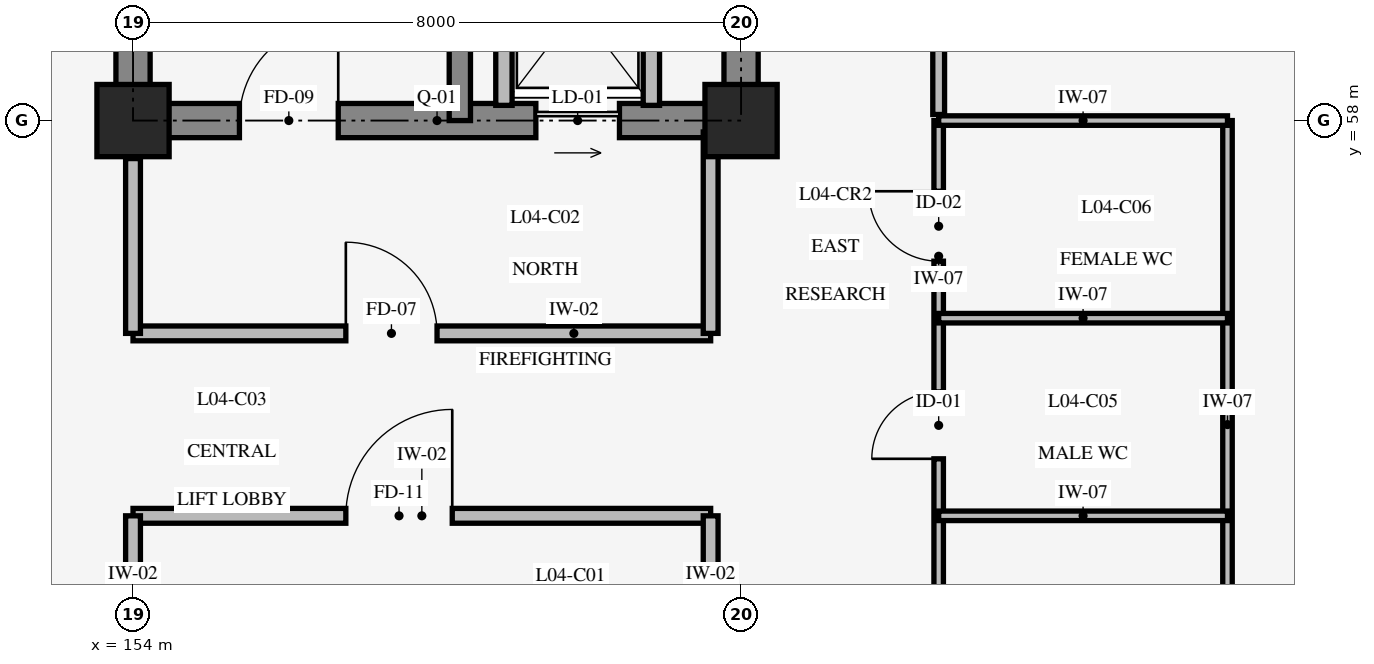
"""IFC4 building model, lengths in metres.
Left out: names, types, materials, properties, quantities, classifications, styles, units other than length and angle.
Written with IfcOpenShell. Run it as: python <this file> out.ifc"""

import sys

from ifc_helpers import new_model, si_unit, direction, frame, frame_2d, origin, origin_2d, place, context, subcontext, project, spatial, rectangle, extrude, element, fill, save


model = new_model("IFC4")
c1 = context("Model", 3, precision=1e-05, world=origin(), true_north=direction((0.0, 1.0)))
c2 = subcontext(c1, "Body", "Model", "MODEL_VIEW")
j1 = project(units=[si_unit("LENGTHUNIT", "METRE"), si_unit("PLANEANGLEUNIT", "RADIAN")], contexts=[c1])
p1 = place(None, origin())
s1 = spatial("IfcSite", under=j1, at=p1, CompositionType="ELEMENT")
p2 = place(p1, origin())
s2 = spatial("IfcBuilding", under=s1, at=p2, CompositionType="ELEMENT")
p3 = place(p2, frame((0.0, 0.0, 15.0)))
s3 = spatial("IfcBuildingStorey", under=s2, at=p3, CompositionType="ELEMENT", Elevation=15.0)
p4 = place(p3, frame((154.0, 58.0, 0.0), z_axis=(0.0, 0.0, 1.0), x_axis=(1.0, 0.0, 0.0)))
e1 = element("IfcWall", 1, at=p4, inside=s3, PredefinedType="SHEAR", context=c2, shape_type="SweptSolid", body=[
    extrude(rectangle(XDim=8.0, YDim=0.45, at=frame_2d((4.0, 0.0))), origin(), (0.0, 0.0, 1.0), 3.95),
])
p5 = place(p4, frame((1.4, 0.0, 0.0)))
e2 = element("IfcOpeningElement", 2, at=p5, cuts=e1, PredefinedType="OPENING", context=c2, shape_type="SweptSolid", body=[
    extrude(rectangle(XDim=1.3, YDim=2.15, at=frame_2d((0.65, 1.075))), frame((0.0, 0.235, 0.0), z_axis=(0.0, -1.0, 0.0), x_axis=(1.0, 0.0, 0.0)), (0.0, 0.0, 1.0), 0.47),
])
p6 = place(p4, frame((5.3, 0.0, 0.0)))
e3 = element("IfcOpeningElement", 3, at=p6, cuts=e1, PredefinedType="OPENING", context=c2, shape_type="SweptSolid", body=[
    extrude(rectangle(XDim=1.1, YDim=2.2, at=frame_2d((0.55, 1.1))), frame((0.0, 0.235, 0.0), z_axis=(0.0, -1.0, 0.0), x_axis=(1.0, 0.0, 0.0)), (0.0, 0.0, 1.0), 0.47),
])
p7 = place(p3, frame((162.0, 58.0, 0.0), z_axis=(0.0, 0.0, 1.0), x_axis=(0.0, 1.0, 0.0)))
e4 = element("IfcWall", 4, at=p7, inside=s3, PredefinedType="SHEAR", context=c2, shape_type="SweptSolid", body=[
    extrude(rectangle(XDim=8.0, YDim=0.45, at=frame_2d((4.0, 0.0))), origin(), (0.0, 0.0, 1.0), 3.95),
])
p8 = place(p7, frame((3.275, 0.0, 0.0)))
e5 = element("IfcOpeningElement", 5, at=p8, cuts=e4, PredefinedType="OPENING", context=c2, shape_type="SweptSolid", body=[
    extrude(rectangle(XDim=1.05, YDim=2.2, at=frame_2d((0.525, 1.1))), frame((0.0, 0.235, 0.0), z_axis=(0.0, -1.0, 0.0), x_axis=(1.0, 0.0, 0.0)), (0.0, 0.0, 1.0), 0.47),
])
p9 = place(p7, frame((5.45, 0.0, 0.0)))
e6 = element("IfcOpeningElement", 6, at=p9, cuts=e4, PredefinedType="OPENING", context=c2, shape_type="SweptSolid", body=[
    extrude(rectangle(XDim=1.4, YDim=2.3, at=frame_2d((0.7, 1.15))), frame((0.0, 0.235, 0.0), z_axis=(0.0, -1.0, 0.0), x_axis=(1.0, 0.0, 0.0)), (0.0, 0.0, 1.0), 0.47),
])
p10 = place(p3, frame((154.0, 66.0, 0.0), z_axis=(0.0, 0.0, 1.0), x_axis=(0.0, -1.0, 0.0)))
e7 = element("IfcWall", 7, at=p10, inside=s3, PredefinedType="SHEAR", context=c2, shape_type="SweptSolid", body=[
    extrude(rectangle(XDim=8.0, YDim=0.45, at=frame_2d((4.0, 0.0))), origin(), (0.0, 0.0, 1.0), 3.95),
])
p11 = place(p3, frame((158.3, 58.0, 0.0), z_axis=(0.0, 0.0, 1.0), x_axis=(0.0, 1.0, 0.0)))
e8 = element("IfcWall", 8, at=p11, inside=s3, PredefinedType="SHEAR", context=c2, shape_type="SweptSolid", body=[
    extrude(rectangle(XDim=8.0, YDim=0.28, at=frame_2d((4.0, 0.0))), origin(), (0.0, 0.0, 1.0), 3.95),
])
for number, where, z_axis, x_axis in (
    (9, (154.0, 58.0, 0.0), (0.0, 0.0, 1.0), (1.0, 0.0, 0.0)),
    (10, (162.0, 58.0, 0.0), (0.0, 0.0, 1.0), (1.0, 0.0, 0.0)),
):
    element("IfcColumn", number, at=place(p3, frame(where, z_axis=z_axis, x_axis=x_axis)), inside=s3, PredefinedType="COLUMN", context=c2, shape_type="SweptSolid", body=[
        extrude(rectangle(XDim=0.95, YDim=0.95, at=origin_2d()), origin(), (0.0, 0.0, 1.0), 4.2),
    ])
for number, where, z_axis, x_axis in (
    (11, (160.82, 58.2, 0.0), (0.0, 0.0, 1.0), (0.0, 1.0, 0.0)),
    (12, (158.88, 58.2, 0.0), (0.0, 0.0, 1.0), (0.0, 1.0, 0.0)),
):
    element("IfcWall", number, at=place(p3, frame(where, z_axis=z_axis, x_axis=x_axis)), inside=s3, PredefinedType="STANDARD", context=c2, shape_type="SweptSolid", body=[
        extrude(rectangle(XDim=2.55, YDim=0.215, at=frame_2d((1.275, 0.0))), origin(), (0.0, 0.0, 1.0), 3.9),
    ])
p12 = place(p3, frame((154.0, 52.8, 0.0), z_axis=(0.0, 0.0, 1.0), x_axis=(1.0, 0.0, 0.0)))
e13 = element("IfcWall", 13, at=p12, inside=s3, PredefinedType="STANDARD", context=c2, shape_type="SweptSolid", body=[
    extrude(rectangle(XDim=7.6, YDim=0.195, at=frame_2d((3.8, 0.0))), origin(), (0.0, 0.0, 1.0), 3.9),
])
p13 = place(p12, frame((2.8, 0.0, 0.0)))
e14 = element("IfcOpeningElement", 14, at=p13, cuts=e13, PredefinedType="OPENING", context=c2, shape_type="SweptSolid", body=[
    extrude(rectangle(XDim=1.4, YDim=2.2, at=frame_2d((0.7, 1.1))), frame((0.0, 0.107, 0.0), z_axis=(0.0, -1.0, 0.0), x_axis=(1.0, 0.0, 0.0)), (0.0, 0.0, 1.0), 0.215),
])
p14 = place(p3, frame((161.6, 50.15, 0.0), z_axis=(0.0, 0.0, 1.0), x_axis=(0.0, 1.0, 0.0)))
e15 = element("IfcWall", 15, at=p14, inside=s3, PredefinedType="STANDARD", context=c2, shape_type="SweptSolid", body=[
    extrude(rectangle(XDim=2.65, YDim=0.195, at=frame_2d((1.325, 0.0))), origin(), (0.0, 0.0, 1.0), 3.08),
])
p15 = place(p3, frame((154.0, 50.5, 0.0), z_axis=(0.0, 0.0, 1.0), x_axis=(0.0, 1.0, 0.0)))
e16 = element("IfcWall", 16, at=p15, inside=s3, PredefinedType="STANDARD", context=c2, shape_type="SweptSolid", body=[
    extrude(rectangle(XDim=2.3, YDim=0.195, at=frame_2d((1.15, 0.0))), origin(), (0.0, 0.0, 1.0), 3.08),
])
p16 = place(p3, frame((154.0, 55.2, 0.0), z_axis=(0.0, 0.0, 1.0), x_axis=(1.0, 0.0, 0.0)))
e17 = element("IfcWall", 17, at=p16, inside=s3, PredefinedType="STANDARD", context=c2, shape_type="SweptSolid", body=[
    extrude(rectangle(XDim=7.6, YDim=0.195, at=frame_2d((3.8, 0.0))), origin(), (0.0, 0.0, 1.0), 3.9),
])
p17 = place(p16, frame((2.8, 0.0, 0.0)))
e18 = element("IfcOpeningElement", 18, at=p17, cuts=e17, PredefinedType="OPENING", context=c2, shape_type="SweptSolid", body=[
    extrude(rectangle(XDim=1.2, YDim=2.1, at=frame_2d((0.6, 1.05))), frame((0.0, 0.107, 0.0), z_axis=(0.0, -1.0, 0.0), x_axis=(1.0, 0.0, 0.0)), (0.0, 0.0, 1.0), 0.215),
])
p18 = place(p3, frame((161.6, 55.2, 0.0), z_axis=(0.0, 0.0, 1.0), x_axis=(0.0, 1.0, 0.0)))
e19 = element("IfcWall", 19, at=p18, inside=s3, PredefinedType="STANDARD", context=c2, shape_type="SweptSolid", body=[
    extrude(rectangle(XDim=2.65, YDim=0.195, at=frame_2d((1.325, 0.0))), origin(), (0.0, 0.0, 1.0), 3.08),
])
p19 = place(p3, frame((154.0, 55.2, 0.0), z_axis=(0.0, 0.0, 1.0), x_axis=(0.0, 1.0, 0.0)))
e20 = element("IfcWall", 20, at=p19, inside=s3, PredefinedType="STANDARD", context=c2, shape_type="SweptSolid", body=[
    extrude(rectangle(XDim=2.3, YDim=0.195, at=frame_2d((1.15, 0.0))), origin(), (0.0, 0.0, 1.0), 3.08),
])
p20 = place(p3, frame((164.6, 50.0, 0.0), z_axis=(0.0, 0.0, 1.0), x_axis=(0.0, 1.0, 0.0)))
e21 = element("IfcWall", 21, at=p20, inside=s3, PredefinedType="STANDARD", context=c2, shape_type="SweptSolid", body=[
    extrude(rectangle(XDim=8.0, YDim=0.125, at=frame_2d((4.0, 0.0))), origin(), (0.0, 0.0, 1.0), 3.9),
])
p21 = place(p20, frame((0.9, 0.0, 0.0)))
e22 = element("IfcOpeningElement", 22, at=p21, cuts=e21, PredefinedType="OPENING", context=c2, shape_type="SweptSolid", body=[
    extrude(rectangle(XDim=0.96, YDim=2.08, at=frame_2d((0.48, 1.04))), frame((0.0, 0.073, 0.0), z_axis=(0.0, -1.0, 0.0), x_axis=(1.0, 0.0, 0.0)), (0.0, 0.0, 1.0), 0.145),
])
p22 = place(p20, frame((3.55, 0.0, 0.0)))
e23 = element("IfcOpeningElement", 23, at=p22, cuts=e21, PredefinedType="OPENING", context=c2, shape_type="SweptSolid", body=[
    extrude(rectangle(XDim=0.88, YDim=2.05, at=frame_2d((0.44, 1.025))), frame((0.0, 0.073, 0.0), z_axis=(0.0, -1.0, 0.0), x_axis=(1.0, 0.0, 0.0)), (0.0, 0.0, 1.0), 0.145),
])
p23 = place(p20, frame((6.15, 0.0, 0.0)))
e24 = element("IfcOpeningElement", 24, at=p23, cuts=e21, PredefinedType="OPENING", context=c2, shape_type="SweptSolid", body=[
    extrude(rectangle(XDim=0.92, YDim=2.05, at=frame_2d((0.46, 1.025))), frame((0.0, 0.073, 0.0), z_axis=(0.0, -1.0, 0.0), x_axis=(1.0, 0.0, 0.0)), (0.0, 0.0, 1.0), 0.145),
])
p24 = place(p3, frame((168.4, 50.0, 0.0), z_axis=(0.0, 0.0, 1.0), x_axis=(0.0, 1.0, 0.0)))
e25 = element("IfcWall", 25, at=p24, inside=s3, PredefinedType="STANDARD", context=c2, shape_type="SweptSolid", body=[
    extrude(rectangle(XDim=8.0, YDim=0.125, at=frame_2d((4.0, 0.0))), origin(), (0.0, 0.0, 1.0), 3.9),
])
for number, where, z_axis, x_axis in (
    (26, (164.6, 52.8, 0.0), (0.0, 0.0, 1.0), (1.0, 0.0, 0.0)),
    (27, (164.6, 55.4, 0.0), (0.0, 0.0, 1.0), (1.0, 0.0, 0.0)),
):
    element("IfcWall", number, at=place(p3, frame(where, z_axis=z_axis, x_axis=x_axis)), inside=s3, PredefinedType="STANDARD", context=c2, shape_type="SweptSolid", body=[
        extrude(rectangle(XDim=3.8, YDim=0.125, at=frame_2d((1.9, 0.0))), origin(), (0.0, 0.0, 1.0), 3.9),
    ])
p25 = place(p3, frame((164.6, 58.0, 0.0), z_axis=(0.0, 0.0, 1.0), x_axis=(1.0, 0.0, 0.0)))
e28 = element("IfcWall", 28, at=p25, inside=s3, PredefinedType="STANDARD", context=c2, shape_type="SweptSolid", body=[
    extrude(rectangle(XDim=3.8, YDim=0.125, at=frame_2d((1.9, 0.0))), origin(), (0.0, 0.0, 1.0), 3.03),
])
p26 = place(p3, frame((164.6, 58.08, 0.0), z_axis=(0.0, 0.0, 1.0), x_axis=(0.0, 1.0, 0.0)))
e29 = element("IfcWall", 29, at=p26, inside=s3, PredefinedType="STANDARD", context=c2, shape_type="SweptSolid", body=[
    extrude(rectangle(XDim=15.8, YDim=0.155, at=frame_2d((7.9, 0.0))), origin(), (0.0, 0.0, 1.0), 3.9),
])
p27 = place(p26, frame((7.2, 0.0, 0.0)))
e30 = element("IfcOpeningElement", 30, at=p27, cuts=e29, PredefinedType="OPENING", context=c2, shape_type="SweptSolid", body=[
    extrude(rectangle(XDim=1.4, YDim=2.2, at=frame_2d((0.7, 1.1))), frame((0.0, 0.087, 0.0), z_axis=(0.0, -1.0, 0.0), x_axis=(1.0, 0.0, 0.0)), (0.0, 0.0, 1.0), 0.175),
])
p28 = place(p5, origin())
e31 = element("IfcDoor", 31, at=p28, inside=s3, OperationType="SINGLE_SWING_RIGHT", PredefinedType="DOOR", context=c2, shape_type="SweptSolid", body=[
    extrude(rectangle(XDim=1.3, YDim=2.15, at=frame_2d((0.65, 1.075))), frame((0.0, 0.025, 0.0), z_axis=(0.0, -1.0, 0.0), x_axis=(1.0, 0.0, 0.0)), (0.0, 0.0, 1.0), 0.05),
])
fill(e2, e31)
p29 = place(p6, origin())
e32 = element("IfcDoor", 32, at=p29, inside=s3, OperationType="SLIDING_TO_RIGHT", PredefinedType="DOOR", context=c2, shape_type="SweptSolid", body=[
    extrude(rectangle(XDim=1.1, YDim=2.2, at=frame_2d((0.55, 1.1))), frame((0.0, 0.025, 0.0), z_axis=(0.0, -1.0, 0.0), x_axis=(1.0, 0.0, 0.0)), (0.0, 0.0, 1.0), 0.05),
])
fill(e3, e32)
p30 = place(p13, origin())
e33 = element("IfcDoor", 33, at=p30, inside=s3, OperationType="SINGLE_SWING_RIGHT", PredefinedType="DOOR", context=c2, shape_type="SweptSolid", body=[
    extrude(rectangle(XDim=1.4, YDim=2.2, at=frame_2d((0.7, 1.1))), frame((0.0, 0.025, 0.0), z_axis=(0.0, -1.0, 0.0), x_axis=(1.0, 0.0, 0.0)), (0.0, 0.0, 1.0), 0.05),
])
fill(e14, e33)
p31 = place(p17, origin())
e34 = element("IfcDoor", 34, at=p31, inside=s3, OperationType="SINGLE_SWING_LEFT", PredefinedType="DOOR", context=c2, shape_type="SweptSolid", body=[
    extrude(rectangle(XDim=1.2, YDim=2.1, at=frame_2d((0.6, 1.05))), frame((0.0, 0.025, 0.0), z_axis=(0.0, -1.0, 0.0), x_axis=(1.0, 0.0, 0.0)), (0.0, 0.0, 1.0), 0.05),
])
fill(e18, e34)
p32 = place(p22, origin())
e35 = element("IfcDoor", 35, at=p32, inside=s3, OperationType="SINGLE_SWING_LEFT", PredefinedType="DOOR", context=c2, shape_type="SweptSolid", body=[
    extrude(rectangle(XDim=0.88, YDim=2.05, at=frame_2d((0.44, 1.025))), frame((0.0, 0.025, 0.0), z_axis=(0.0, -1.0, 0.0), x_axis=(1.0, 0.0, 0.0)), (0.0, 0.0, 1.0), 0.05),
])
fill(e23, e35)
p33 = place(p23, origin())
e36 = element("IfcDoor", 36, at=p33, inside=s3, OperationType="SINGLE_SWING_RIGHT", PredefinedType="DOOR", context=c2, shape_type="SweptSolid", body=[
    extrude(rectangle(XDim=0.92, YDim=2.05, at=frame_2d((0.46, 1.025))), frame((0.0, 0.025, 0.0), z_axis=(0.0, -1.0, 0.0), x_axis=(1.0, 0.0, 0.0)), (0.0, 0.0, 1.0), 0.05),
])
fill(e24, e36)
save(model, sys.argv[1])
